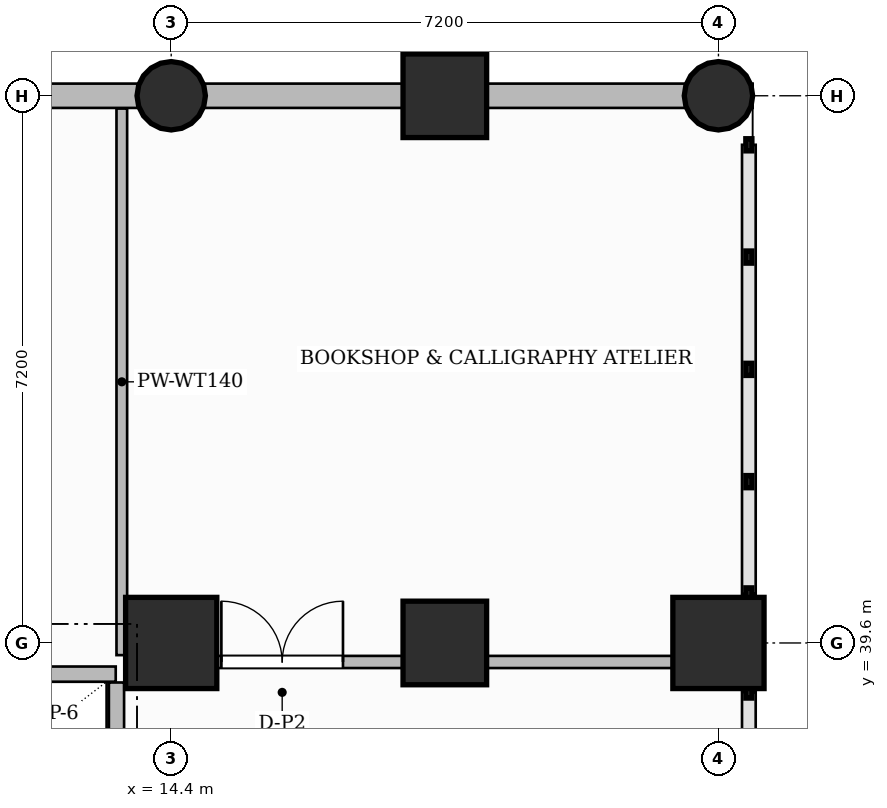
"""IFC4 building model, lengths in metres.
Left out: names, types, materials, properties, quantities, classifications, styles, units other than length and angle.
Written with IfcOpenShell. Run it as: python <this file> out.ifc"""

import sys

from ifc_helpers import new_model, si_unit, direction, frame, frame_2d, origin, origin_2d, place, context, subcontext, project, spatial, rectangle, circle, extrude, source, transform, mapped, element, fill, save


model = new_model("IFC4")
c1 = context("Model", 3, precision=1e-05, world=origin(), true_north=direction((0.0, 1.0)))
c2 = subcontext(c1, "Body", "Model", "MODEL_VIEW")
j1 = project(units=[si_unit("LENGTHUNIT", "METRE"), si_unit("PLANEANGLEUNIT", "RADIAN")], contexts=[c1])
p1 = place(None, origin())
s1 = spatial("IfcSite", under=j1, at=p1, CompositionType="ELEMENT")
p2 = place(p1, origin())
s2 = spatial("IfcBuilding", under=s1, at=p2, CompositionType="ELEMENT")
p3 = place(p2, frame((0.0, 0.0, 5.4)))
s3 = spatial("IfcBuildingStorey", under=s2, at=p3, CompositionType="ELEMENT", Elevation=5.4)
m1 = source(origin(), c2, "Body", "SweptSolid", [
    extrude(rectangle(XDim=1.2, YDim=1.2, at=origin_2d()), origin(), (0.0, 0.0, 1.0), 5.4),
])
p4 = place(p3, frame((14.4, 39.6, 0.0), z_axis=(0.0, 0.0, 1.0), x_axis=(1.0, 0.0, 0.0)))
e1 = element("IfcColumn", 1, at=p4, inside=s3, PredefinedType="COLUMN", context=c2, shape_type="MappedRepresentation", body=[
    mapped(m1, transform((0.0, 0.0, 0.0), scale=1.0)),
])
m2 = source(origin(), c2, "Body", "SweptSolid", [
    extrude(circle(Radius=0.45, at=origin_2d()), origin(), (0.0, 0.0, 1.0), 5.4),
])
p5 = place(p3, frame((14.4, 46.8, 0.0), z_axis=(0.0, 0.0, 1.0), x_axis=(1.0, 0.0, 0.0)))
e2 = element("IfcColumn", 2, at=p5, inside=s3, PredefinedType="COLUMN", context=c2, shape_type="MappedRepresentation", body=[
    mapped(m2, transform((0.0, 0.0, 0.0), scale=1.0)),
])
p6 = place(p3, frame((21.6, 39.6, 0.0), z_axis=(0.0, 0.0, 1.0), x_axis=(1.0, 0.0, 0.0)))
e3 = element("IfcColumn", 3, at=p6, inside=s3, PredefinedType="COLUMN", context=c2, shape_type="MappedRepresentation", body=[
    mapped(m1, transform((0.0, 0.0, 0.0), scale=1.0)),
])
p7 = place(p3, frame((21.6, 46.8, 0.0), z_axis=(0.0, 0.0, 1.0), x_axis=(1.0, 0.0, 0.0)))
e4 = element("IfcColumn", 4, at=p7, inside=s3, PredefinedType="COLUMN", context=c2, shape_type="MappedRepresentation", body=[
    mapped(m2, transform((0.0, 0.0, 0.0), scale=1.0)),
])
m3 = source(origin(), c2, "Body", "SweptSolid", [
    extrude(rectangle(XDim=1.1, YDim=1.1, at=origin_2d()), origin(), (0.0, 0.0, 1.0), 5.4),
])
for number, where, z_axis, x_axis in (
    (5, (18.0, 39.6, 0.0), (0.0, 0.0, 1.0), (1.0, 0.0, 0.0)),
    (6, (18.0, 46.8, 0.0), (0.0, 0.0, 1.0), (1.0, 0.0, 0.0)),
):
    element("IfcColumn", number, at=place(p3, frame(where, z_axis=z_axis, x_axis=x_axis)), inside=s3, PredefinedType="COLUMN", context=c2, shape_type="MappedRepresentation", body=[
        mapped(m3, transform((0.0, 0.0, 0.0), scale=1.0)),
    ])
p8 = place(p3, frame((11.71, 39.19, 0.0), z_axis=(0.0, 0.0, 1.0), x_axis=(1.0, 0.0, 0.0)))
e7 = element("IfcWall", 7, at=p8, inside=s3, PredefinedType="PARTITIONING", context=c2, shape_type="SweptSolid", body=[
    extrude(rectangle(XDim=1.96, YDim=0.2, at=frame_2d((0.98, 0.0))), origin(), (0.0, 0.0, 1.0), 5.1),
])
p9 = place(p3, frame((13.68, 34.36, 0.0), z_axis=(0.0, 0.0, 1.0), x_axis=(0.0, 1.0, 0.0)))
e8 = element("IfcWall", 8, at=p9, inside=s3, PredefinedType="PARTITIONING", context=c2, shape_type="SweptSolid", body=[
    extrude(rectangle(XDim=4.72, YDim=0.2, at=frame_2d((2.36, 0.0))), origin(), (0.0, 0.0, 1.0), 5.1),
])
p10 = place(p3, frame((13.75, 39.44, 0.0), z_axis=(0.0, 0.0, 1.0), x_axis=(0.0, 1.0, 0.0)))
e9 = element("IfcWall", 9, at=p10, inside=s3, PredefinedType="PARTITIONING", context=c2, shape_type="SweptSolid", body=[
    extrude(rectangle(XDim=7.192, YDim=0.14, at=frame_2d((3.596, 0.0))), origin(), (0.0, 0.0, 1.0), 5.1),
])
p11 = place(p3, frame((13.84, 39.35, 0.0), z_axis=(0.0, 0.0, 1.0), x_axis=(1.0, 0.0, 0.0)))
e10 = element("IfcWall", 10, at=p11, inside=s3, PredefinedType="PARTITIONING", context=c2, shape_type="SweptSolid", body=[
    extrude(rectangle(XDim=7.92, YDim=0.16, at=frame_2d((3.96, 0.0))), origin(), (0.0, 0.0, 1.0), 4.185),
])
p12 = place(p11, frame((1.22, 0.0, 0.0)))
e11 = element("IfcOpeningElement", 11, at=p12, cuts=e10, PredefinedType="OPENING", context=c2, shape_type="SweptSolid", body=[
    extrude(rectangle(XDim=1.6, YDim=2.4, at=frame_2d((0.8, 1.2))), frame((0.0, 0.09, 0.0), z_axis=(0.0, -1.0, 0.0), x_axis=(1.0, 0.0, 0.0)), (0.0, 0.0, 1.0), 0.18),
])
p13 = place(p3, frame((-4.8, 46.8, 0.0), z_axis=(0.0, 0.0, 1.0), x_axis=(1.0, 0.0, 0.0)))
e12 = element("IfcWall", 12, at=p13, inside=s3, PredefinedType="SOLIDWALL", context=c2, shape_type="SweptSolid", body=[
    extrude(rectangle(XDim=26.85, YDim=0.32, at=frame_2d((13.425, 0.0))), origin(), (0.0, 0.0, 1.0), 4.185),
])
p14 = place(p13, frame((1.4, 0.0, 0.75)))
e13 = element("IfcOpeningElement", 13, at=p14, cuts=e12, PredefinedType="OPENING", context=c2, shape_type="SweptSolid", body=[
    extrude(rectangle(XDim=2.0, YDim=2.6, at=frame_2d((1.0, 1.3))), frame((0.0, 0.17, 0.0), z_axis=(0.0, -1.0, 0.0), x_axis=(1.0, 0.0, 0.0)), (0.0, 0.0, 1.0), 0.34),
])
p15 = place(p13, frame((7.4, 0.0, 0.75)))
e14 = element("IfcOpeningElement", 14, at=p15, cuts=e12, PredefinedType="OPENING", context=c2, shape_type="SweptSolid", body=[
    extrude(rectangle(XDim=2.0, YDim=2.6, at=frame_2d((1.0, 1.3))), frame((0.0, 0.17, 0.0), z_axis=(0.0, -1.0, 0.0), x_axis=(1.0, 0.0, 0.0)), (0.0, 0.0, 1.0), 0.34),
])
p16 = place(p13, frame((14.6, 0.0, 0.75)))
e15 = element("IfcOpeningElement", 15, at=p16, cuts=e12, PredefinedType="OPENING", context=c2, shape_type="SweptSolid", body=[
    extrude(rectangle(XDim=2.0, YDim=2.6, at=frame_2d((1.0, 1.3))), frame((0.0, 0.17, 0.0), z_axis=(0.0, -1.0, 0.0), x_axis=(1.0, 0.0, 0.0)), (0.0, 0.0, 1.0), 0.34),
])
m4 = source(origin(), c2, "Body", "SweptSolid", [
    extrude(rectangle(XDim=1.6, YDim=2.4, at=frame_2d((0.8, 1.2))), frame((0.0, 0.025, 0.0), z_axis=(0.0, -1.0, 0.0), x_axis=(1.0, 0.0, 0.0)), (0.0, 0.0, 1.0), 0.05),
])
p17 = place(p12, origin())
e16 = element("IfcDoor", 16, at=p17, inside=s3, OperationType="DOUBLE_DOOR_SINGLE_SWING", PredefinedType="DOOR", context=c2, shape_type="MappedRepresentation", body=[
    mapped(m4, transform((0.0, 0.0, 0.0), scale=1.0)),
])
fill(e11, e16)
save(model, sys.argv[1])
